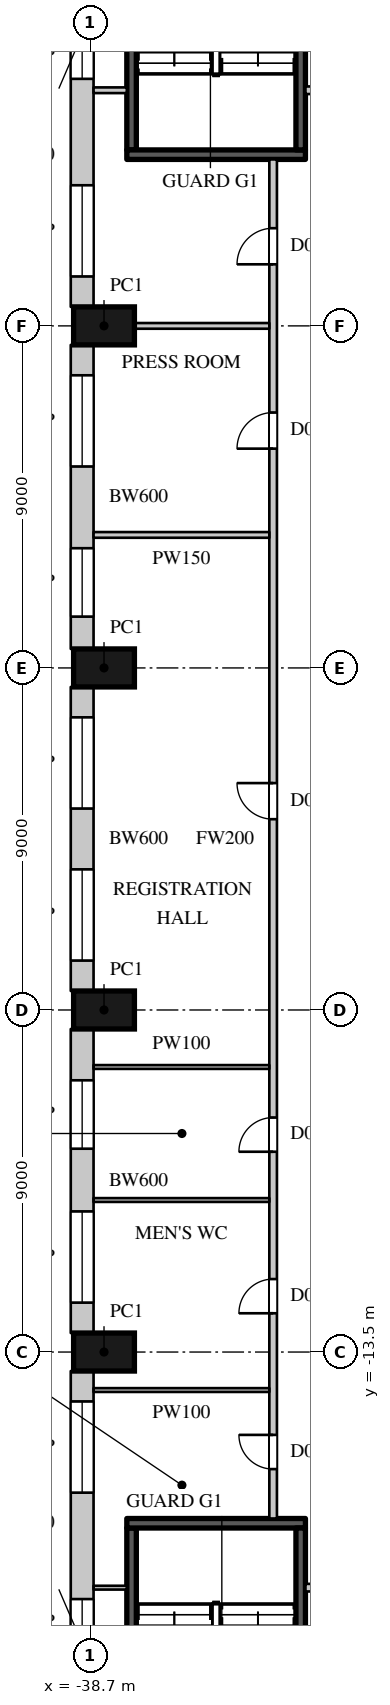
"""IFC4 building model, lengths in metres.
Left out: names, types, materials, properties, quantities, classifications, styles, units other than length and angle.
Written with IfcOpenShell. Run it as: python <this file> out.ifc"""

import sys

from ifc_helpers import new_model, si_unit, direction, frame, frame_2d, origin, origin_2d, place, context, subcontext, project, spatial, rectangle, extrude, element, fill, save


model = new_model("IFC4")
c1 = context("Model", 3, precision=1e-05, world=origin(), true_north=direction((0.0, 1.0)))
c2 = subcontext(c1, "Body", "Model", "MODEL_VIEW")
j1 = project(units=[si_unit("LENGTHUNIT", "METRE"), si_unit("PLANEANGLEUNIT", "RADIAN")], contexts=[c1])
p1 = place(None, origin())
s1 = spatial("IfcSite", under=j1, at=p1, CompositionType="ELEMENT")
p2 = place(p1, origin())
s2 = spatial("IfcBuilding", under=s1, at=p2, CompositionType="ELEMENT")
p3 = place(p2, frame((0.0, 0.0, 9.0)))
s3 = spatial("IfcBuildingStorey", under=s2, at=p3, CompositionType="ELEMENT", Elevation=9.0)
for number, where, z_axis, x_axis in (
    (1, (-38.35, 13.5, 0.0), (0.0, 0.0, 1.0), (0.0, -1.0, 0.0)),
    (2, (-38.35, 4.5, 0.0), (0.0, 0.0, 1.0), (0.0, -1.0, 0.0)),
    (3, (-38.35, -4.5, 0.0), (0.0, 0.0, 1.0), (0.0, -1.0, 0.0)),
    (4, (-38.35, -13.5, 0.0), (0.0, 0.0, 1.0), (0.0, -1.0, 0.0)),
):
    element("IfcColumn", number, at=place(p3, frame(where, z_axis=z_axis, x_axis=x_axis)), inside=s3, PredefinedType="COLUMN", context=c2, shape_type="SweptSolid", body=[
        extrude(rectangle(XDim=1.0, YDim=1.6, at=origin_2d()), origin(), (0.0, 0.0, 1.0), 10.0),
    ])
p4 = place(p3, frame((-38.925, 22.0, 0.0), z_axis=(0.0, 0.0, 1.0), x_axis=(0.0, -1.0, 0.0)))
e5 = element("IfcWall", 5, at=p4, inside=s3, PredefinedType="ELEMENTEDWALL", context=c2, shape_type="SweptSolid", body=[
    extrude(rectangle(XDim=8.0, YDim=0.6, at=frame_2d((4.0, 0.0))), origin(), (0.0, 0.0, 1.0), 9.6),
])
p5 = place(p4, frame((4.8, 0.0, 3.0)))
e6 = element("IfcOpeningElement", 6, at=p5, cuts=e5, PredefinedType="OPENING", context=c2, shape_type="SweptSolid", body=[
    extrude(rectangle(XDim=2.4, YDim=2.4, at=frame_2d((1.2, 1.2))), frame((0.0, 0.31, 0.0), z_axis=(0.0, -1.0, 0.0), x_axis=(1.0, 0.0, 0.0)), (0.0, 0.0, 1.0), 0.62),
])
p6 = place(p4, frame((0.8, 0.0, 3.0)))
e7 = element("IfcOpeningElement", 7, at=p6, cuts=e5, PredefinedType="OPENING", context=c2, shape_type="SweptSolid", body=[
    extrude(rectangle(XDim=1.2, YDim=2.4, at=frame_2d((0.6, 1.2))), frame((0.0, 0.31, 0.0), z_axis=(0.0, -1.0, 0.0), x_axis=(1.0, 0.0, 0.0)), (0.0, 0.0, 1.0), 0.62),
])
p7 = place(p3, frame((-38.925, 13.0, 0.0), z_axis=(0.0, 0.0, 1.0), x_axis=(0.0, -1.0, 0.0)))
e8 = element("IfcWall", 8, at=p7, inside=s3, PredefinedType="ELEMENTEDWALL", context=c2, shape_type="SweptSolid", body=[
    extrude(rectangle(XDim=8.0, YDim=0.6, at=frame_2d((4.0, 0.0))), origin(), (0.0, 0.0, 1.0), 9.6),
])
p8 = place(p7, frame((0.8, 0.0, 3.0)))
e9 = element("IfcOpeningElement", 9, at=p8, cuts=e8, PredefinedType="OPENING", context=c2, shape_type="SweptSolid", body=[
    extrude(rectangle(XDim=2.4, YDim=2.4, at=frame_2d((1.2, 1.2))), frame((0.0, 0.31, 0.0), z_axis=(0.0, -1.0, 0.0), x_axis=(1.0, 0.0, 0.0)), (0.0, 0.0, 1.0), 0.62),
])
p9 = place(p7, frame((5.35, 0.0, 3.0)))
e10 = element("IfcOpeningElement", 10, at=p9, cuts=e8, PredefinedType="OPENING", context=c2, shape_type="SweptSolid", body=[
    extrude(rectangle(XDim=1.8, YDim=2.4, at=frame_2d((0.9, 1.2))), frame((0.0, 0.31, 0.0), z_axis=(0.0, -1.0, 0.0), x_axis=(1.0, 0.0, 0.0)), (0.0, 0.0, 1.0), 0.62),
])
p10 = place(p3, frame((-38.925, 4.0, 0.0), z_axis=(0.0, 0.0, 1.0), x_axis=(0.0, -1.0, 0.0)))
e11 = element("IfcWall", 11, at=p10, inside=s3, PredefinedType="ELEMENTEDWALL", context=c2, shape_type="SweptSolid", body=[
    extrude(rectangle(XDim=8.0, YDim=0.6, at=frame_2d((4.0, 0.0))), origin(), (0.0, 0.0, 1.0), 9.6),
])
p11 = place(p10, frame((0.8, 0.0, 3.0)))
e12 = element("IfcOpeningElement", 12, at=p11, cuts=e11, PredefinedType="OPENING", context=c2, shape_type="SweptSolid", body=[
    extrude(rectangle(XDim=2.4, YDim=2.4, at=frame_2d((1.2, 1.2))), frame((0.0, 0.31, 0.0), z_axis=(0.0, -1.0, 0.0), x_axis=(1.0, 0.0, 0.0)), (0.0, 0.0, 1.0), 0.62),
])
p12 = place(p10, frame((4.8, 0.0, 3.0)))
e13 = element("IfcOpeningElement", 13, at=p12, cuts=e11, PredefinedType="OPENING", context=c2, shape_type="SweptSolid", body=[
    extrude(rectangle(XDim=2.4, YDim=2.4, at=frame_2d((1.2, 1.2))), frame((0.0, 0.31, 0.0), z_axis=(0.0, -1.0, 0.0), x_axis=(1.0, 0.0, 0.0)), (0.0, 0.0, 1.0), 0.62),
])
p13 = place(p3, frame((-38.925, -5.0, 0.0), z_axis=(0.0, 0.0, 1.0), x_axis=(0.0, -1.0, 0.0)))
e14 = element("IfcWall", 14, at=p13, inside=s3, PredefinedType="ELEMENTEDWALL", context=c2, shape_type="SweptSolid", body=[
    extrude(rectangle(XDim=8.0, YDim=0.6, at=frame_2d((4.0, 0.0))), origin(), (0.0, 0.0, 1.0), 9.6),
])
p14 = place(p13, frame((4.8, 0.0, 3.0)))
e15 = element("IfcOpeningElement", 15, at=p14, cuts=e14, PredefinedType="OPENING", context=c2, shape_type="SweptSolid", body=[
    extrude(rectangle(XDim=2.4, YDim=2.4, at=frame_2d((1.2, 1.2))), frame((0.0, 0.31, 0.0), z_axis=(0.0, -1.0, 0.0), x_axis=(1.0, 0.0, 0.0)), (0.0, 0.0, 1.0), 0.62),
])
p15 = place(p13, frame((1.35, 0.0, 3.0)))
e16 = element("IfcOpeningElement", 16, at=p15, cuts=e14, PredefinedType="OPENING", context=c2, shape_type="SweptSolid", body=[
    extrude(rectangle(XDim=1.8, YDim=2.4, at=frame_2d((0.9, 1.2))), frame((0.0, 0.31, 0.0), z_axis=(0.0, -1.0, 0.0), x_axis=(1.0, 0.0, 0.0)), (0.0, 0.0, 1.0), 0.62),
])
p16 = place(p3, frame((-38.925, -14.0, 0.0), z_axis=(0.0, 0.0, 1.0), x_axis=(0.0, -1.0, 0.0)))
e17 = element("IfcWall", 17, at=p16, inside=s3, PredefinedType="ELEMENTEDWALL", context=c2, shape_type="SweptSolid", body=[
    extrude(rectangle(XDim=8.0, YDim=0.6, at=frame_2d((4.0, 0.0))), origin(), (0.0, 0.0, 1.0), 9.6),
])
p17 = place(p16, frame((0.8, 0.0, 3.0)))
e18 = element("IfcOpeningElement", 18, at=p17, cuts=e17, PredefinedType="OPENING", context=c2, shape_type="SweptSolid", body=[
    extrude(rectangle(XDim=2.4, YDim=2.4, at=frame_2d((1.2, 1.2))), frame((0.0, 0.31, 0.0), z_axis=(0.0, -1.0, 0.0), x_axis=(1.0, 0.0, 0.0)), (0.0, 0.0, 1.0), 0.62),
])
p18 = place(p16, frame((6.0, 0.0, 3.0)))
e19 = element("IfcOpeningElement", 19, at=p18, cuts=e17, PredefinedType="OPENING", context=c2, shape_type="SweptSolid", body=[
    extrude(rectangle(XDim=1.2, YDim=2.4, at=frame_2d((0.6, 1.2))), frame((0.0, 0.31, 0.0), z_axis=(0.0, -1.0, 0.0), x_axis=(1.0, 0.0, 0.0)), (0.0, 0.0, 1.0), 0.62),
])
p19 = place(p3, frame((-33.9, -17.88, 0.0), z_axis=(0.0, 0.0, 1.0), x_axis=(0.0, 1.0, 0.0)))
e20 = element("IfcWall", 20, at=p19, inside=s3, PredefinedType="PARTITIONING", context=c2, shape_type="SweptSolid", body=[
    extrude(rectangle(XDim=35.76, YDim=0.2, at=frame_2d((17.88, 0.0))), origin(), (0.0, 0.0, 1.0), 9.598),
])
p20 = place(p19, frame((1.3, 0.0, 0.0)))
e21 = element("IfcOpeningElement", 21, at=p20, cuts=e20, PredefinedType="OPENING", context=c2, shape_type="SweptSolid", body=[
    extrude(rectangle(XDim=0.9, YDim=2.2, at=frame_2d((0.45, 1.1))), frame((0.0, 0.11, 0.0), z_axis=(0.0, -1.0, 0.0), x_axis=(1.0, 0.0, 0.0)), (0.0, 0.0, 1.0), 0.22),
])
p21 = place(p19, frame((5.4, 0.0, 0.0)))
e22 = element("IfcOpeningElement", 22, at=p21, cuts=e20, PredefinedType="OPENING", context=c2, shape_type="SweptSolid", body=[
    extrude(rectangle(XDim=0.9, YDim=2.2, at=frame_2d((0.45, 1.1))), frame((0.0, 0.11, 0.0), z_axis=(0.0, -1.0, 0.0), x_axis=(1.0, 0.0, 0.0)), (0.0, 0.0, 1.0), 0.22),
])
p22 = place(p19, frame((9.65, 0.0, 0.0)))
e23 = element("IfcOpeningElement", 23, at=p22, cuts=e20, PredefinedType="OPENING", context=c2, shape_type="SweptSolid", body=[
    extrude(rectangle(XDim=0.9, YDim=2.2, at=frame_2d((0.45, 1.1))), frame((0.0, 0.11, 0.0), z_axis=(0.0, -1.0, 0.0), x_axis=(1.0, 0.0, 0.0)), (0.0, 0.0, 1.0), 0.22),
])
p23 = place(p19, frame((18.4, 0.0, 0.0)))
e24 = element("IfcOpeningElement", 24, at=p23, cuts=e20, PredefinedType="OPENING", context=c2, shape_type="SweptSolid", body=[
    extrude(rectangle(XDim=0.95, YDim=2.2, at=frame_2d((0.475, 1.1))), frame((0.0, 0.11, 0.0), z_axis=(0.0, -1.0, 0.0), x_axis=(1.0, 0.0, 0.0)), (0.0, 0.0, 1.0), 0.22),
])
p24 = place(p19, frame((28.15, 0.0, 0.0)))
e25 = element("IfcOpeningElement", 25, at=p24, cuts=e20, PredefinedType="OPENING", context=c2, shape_type="SweptSolid", body=[
    extrude(rectangle(XDim=0.95, YDim=2.2, at=frame_2d((0.475, 1.1))), frame((0.0, 0.11, 0.0), z_axis=(0.0, -1.0, 0.0), x_axis=(1.0, 0.0, 0.0)), (0.0, 0.0, 1.0), 0.22),
])
p25 = place(p19, frame((33.0, 0.0, 0.0)))
e26 = element("IfcOpeningElement", 26, at=p25, cuts=e20, PredefinedType="OPENING", context=c2, shape_type="SweptSolid", body=[
    extrude(rectangle(XDim=0.95, YDim=2.2, at=frame_2d((0.475, 1.1))), frame((0.0, 0.11, 0.0), z_axis=(0.0, -1.0, 0.0), x_axis=(1.0, 0.0, 0.0)), (0.0, 0.0, 1.0), 0.22),
])
p26 = place(p3, frame((-33.05, -19.7, 0.0), z_axis=(0.0, 0.0, 1.0), x_axis=(1.0, 0.0, 0.0)))
e27 = element("IfcWall", 27, at=p26, inside=s3, PredefinedType="PARTITIONING", context=c2, shape_type="SweptSolid", body=[
    extrude(rectangle(XDim=3.077, YDim=0.2, at=frame_2d((1.539, 0.0))), origin(), (0.0, 0.0, 1.0), 9.598),
])
p27 = place(p26, frame((0.7, 0.0, 0.0)))
e28 = element("IfcOpeningElement", 28, at=p27, cuts=e27, PredefinedType="OPENING", context=c2, shape_type="SweptSolid", body=[
    extrude(rectangle(XDim=1.6, YDim=2.4, at=frame_2d((0.8, 1.2))), frame((0.0, 0.11, 0.0), z_axis=(0.0, -1.0, 0.0), x_axis=(1.0, 0.0, 0.0)), (0.0, 0.0, 1.0), 0.22),
])
p28 = place(p3, frame((-33.05, 19.7, 0.0), z_axis=(0.0, 0.0, 1.0), x_axis=(1.0, 0.0, 0.0)))
e29 = element("IfcWall", 29, at=p28, inside=s3, PredefinedType="PARTITIONING", context=c2, shape_type="SweptSolid", body=[
    extrude(rectangle(XDim=3.077, YDim=0.2, at=frame_2d((1.539, 0.0))), origin(), (0.0, 0.0, 1.0), 9.598),
])
p29 = place(p28, frame((0.7, 0.0, 0.0)))
e30 = element("IfcOpeningElement", 30, at=p29, cuts=e29, PredefinedType="OPENING", context=c2, shape_type="SweptSolid", body=[
    extrude(rectangle(XDim=1.6, YDim=2.4, at=frame_2d((0.8, 1.2))), frame((0.0, 0.11, 0.0), z_axis=(0.0, -1.0, 0.0), x_axis=(1.0, 0.0, 0.0)), (0.0, 0.0, 1.0), 0.22),
])
p30 = place(p3, frame((-38.625, 8.0, 0.0), z_axis=(0.0, 0.0, 1.0), x_axis=(1.0, 0.0, 0.0)))
e31 = element("IfcWall", 31, at=p30, inside=s3, PredefinedType="PARTITIONING", context=c2, shape_type="SweptSolid", body=[
    extrude(rectangle(XDim=4.625, YDim=0.15, at=frame_2d((2.312, 0.0))), origin(), (0.0, 0.0, 1.0), 9.598),
])
p31 = place(p3, frame((-37.55, 13.5, 0.0), z_axis=(0.0, 0.0, 1.0), x_axis=(1.0, 0.0, 0.0)))
e32 = element("IfcWall", 32, at=p31, inside=s3, PredefinedType="PARTITIONING", context=c2, shape_type="SweptSolid", body=[
    extrude(rectangle(XDim=3.55, YDim=0.15, at=frame_2d((1.775, 0.0))), origin(), (0.0, 0.0, 1.0), 9.598),
])
p32 = place(p3, frame((-38.625, 19.7, 0.0), z_axis=(0.0, 0.0, 1.0), x_axis=(1.0, 0.0, 0.0)))
e33 = element("IfcWall", 33, at=p32, inside=s3, PredefinedType="PARTITIONING", context=c2, shape_type="SweptSolid", body=[
    extrude(rectangle(XDim=0.875, YDim=0.15, at=frame_2d((0.438, 0.0))), origin(), (0.0, 0.0, 1.0), 9.598),
])
p33 = place(p3, frame((-37.625, -22.0, 0.0), z_axis=(0.0, 0.0, 1.0), x_axis=(0.0, 1.0, 0.0)))
e34 = element("IfcWall", 34, at=p33, inside=s3, PredefinedType="SHEAR", context=c2, shape_type="SweptSolid", body=[
    extrude(rectangle(XDim=3.87, YDim=0.25, at=frame_2d((1.935, 0.0))), origin(), (0.0, 0.0, 1.0), 9.6),
])
p34 = place(p3, frame((-37.75, -18.005, 0.0), z_axis=(0.0, 0.0, 1.0), x_axis=(1.0, 0.0, 0.0)))
e35 = element("IfcWall", 35, at=p34, inside=s3, PredefinedType="SHEAR", context=c2, shape_type="SweptSolid", body=[
    extrude(rectangle(XDim=4.7, YDim=0.25, at=frame_2d((2.35, 0.0))), origin(), (0.0, 0.0, 1.0), 9.6),
])
p35 = place(p3, frame((-37.625, 18.13, 0.0), z_axis=(0.0, 0.0, 1.0), x_axis=(0.0, 1.0, 0.0)))
e36 = element("IfcWall", 36, at=p35, inside=s3, PredefinedType="SHEAR", context=c2, shape_type="SweptSolid", body=[
    extrude(rectangle(XDim=3.87, YDim=0.25, at=frame_2d((1.935, 0.0))), origin(), (0.0, 0.0, 1.0), 9.6),
])
p36 = place(p3, frame((-37.75, 18.005, 0.0), z_axis=(0.0, 0.0, 1.0), x_axis=(1.0, 0.0, 0.0)))
e37 = element("IfcWall", 37, at=p36, inside=s3, PredefinedType="SHEAR", context=c2, shape_type="SweptSolid", body=[
    extrude(rectangle(XDim=4.7, YDim=0.25, at=frame_2d((2.35, 0.0))), origin(), (0.0, 0.0, 1.0), 9.6),
])
p37 = place(p3, frame((-33.175, -26.05, 0.0), z_axis=(0.0, 0.0, 1.0), x_axis=(0.0, 1.0, 0.0)))
e38 = element("IfcWall", 38, at=p37, inside=s3, PredefinedType="SHEAR", context=c2, shape_type="SweptSolid", body=[
    extrude(rectangle(XDim=7.92, YDim=0.25, at=frame_2d((3.96, 0.0))), origin(), (0.0, 0.0, 1.0), 9.6),
])
p38 = place(p37, frame((0.55, 0.0, 0.0)))
e39 = element("IfcOpeningElement", 39, at=p38, cuts=e38, PredefinedType="OPENING", context=c2, shape_type="SweptSolid", body=[
    extrude(rectangle(XDim=0.9, YDim=2.2, at=frame_2d((0.45, 1.1))), frame((0.0, 0.135, 0.0), z_axis=(0.0, -1.0, 0.0), x_axis=(1.0, 0.0, 0.0)), (0.0, 0.0, 1.0), 0.27),
])
p39 = place(p3, frame((-33.175, 18.13, 0.0), z_axis=(0.0, 0.0, 1.0), x_axis=(0.0, 1.0, 0.0)))
e40 = element("IfcWall", 40, at=p39, inside=s3, PredefinedType="SHEAR", context=c2, shape_type="SweptSolid", body=[
    extrude(rectangle(XDim=7.92, YDim=0.25, at=frame_2d((3.96, 0.0))), origin(), (0.0, 0.0, 1.0), 9.6),
])
p40 = place(p39, frame((6.45, 0.0, 0.0)))
e41 = element("IfcOpeningElement", 41, at=p40, cuts=e40, PredefinedType="OPENING", context=c2, shape_type="SweptSolid", body=[
    extrude(rectangle(XDim=0.9, YDim=2.2, at=frame_2d((0.45, 1.1))), frame((0.0, 0.135, 0.0), z_axis=(0.0, -1.0, 0.0), x_axis=(1.0, 0.0, 0.0)), (0.0, 0.0, 1.0), 0.27),
])
p41 = place(p3, frame((-38.625, -19.7, 0.0), z_axis=(0.0, 0.0, 1.0), x_axis=(1.0, 0.0, 0.0)))
e42 = element("IfcWall", 42, at=p41, inside=s3, PredefinedType="PARTITIONING", context=c2, shape_type="SweptSolid", body=[
    extrude(rectangle(XDim=0.875, YDim=0.1, at=frame_2d((0.438, 0.0))), origin(), (0.0, 0.0, 1.0), 9.598),
])
for number, where, z_axis, x_axis in (
    (43, (-38.625, -14.5, 0.0), (0.0, 0.0, 1.0), (1.0, 0.0, 0.0)),
    (44, (-38.625, -9.5, 0.0), (0.0, 0.0, 1.0), (1.0, 0.0, 0.0)),
    (45, (-38.625, -6.0, 0.0), (0.0, 0.0, 1.0), (1.0, 0.0, 0.0)),
):
    element("IfcWall", number, at=place(p3, frame(where, z_axis=z_axis, x_axis=x_axis)), inside=s3, PredefinedType="PARTITIONING", context=c2, shape_type="SweptSolid", body=[
        extrude(rectangle(XDim=4.625, YDim=0.1, at=frame_2d((2.312, 0.0))), origin(), (0.0, 0.0, 1.0), 9.598),
    ])
p42 = place(p5, origin())
e46 = element("IfcWindow", 46, at=p42, inside=s3, PartitioningType="SINGLE_PANEL", PredefinedType="WINDOW", context=c2, shape_type="SweptSolid", body=[
    extrude(rectangle(XDim=2.4, YDim=2.4, at=frame_2d((1.2, 1.2))), frame((0.0, 0.06, 0.0), z_axis=(0.0, -1.0, 0.0), x_axis=(1.0, 0.0, 0.0)), (0.0, 0.0, 1.0), 0.06),
])
fill(e6, e46)
p43 = place(p8, origin())
e47 = element("IfcWindow", 47, at=p43, inside=s3, PartitioningType="SINGLE_PANEL", PredefinedType="WINDOW", context=c2, shape_type="SweptSolid", body=[
    extrude(rectangle(XDim=2.4, YDim=2.4, at=frame_2d((1.2, 1.2))), frame((0.0, 0.06, 0.0), z_axis=(0.0, -1.0, 0.0), x_axis=(1.0, 0.0, 0.0)), (0.0, 0.0, 1.0), 0.06),
])
fill(e9, e47)
p44 = place(p11, origin())
e48 = element("IfcWindow", 48, at=p44, inside=s3, PartitioningType="SINGLE_PANEL", PredefinedType="WINDOW", context=c2, shape_type="SweptSolid", body=[
    extrude(rectangle(XDim=2.4, YDim=2.4, at=frame_2d((1.2, 1.2))), frame((0.0, 0.06, 0.0), z_axis=(0.0, -1.0, 0.0), x_axis=(1.0, 0.0, 0.0)), (0.0, 0.0, 1.0), 0.06),
])
fill(e12, e48)
p45 = place(p12, origin())
e49 = element("IfcWindow", 49, at=p45, inside=s3, PartitioningType="SINGLE_PANEL", PredefinedType="WINDOW", context=c2, shape_type="SweptSolid", body=[
    extrude(rectangle(XDim=2.4, YDim=2.4, at=frame_2d((1.2, 1.2))), frame((0.0, 0.06, 0.0), z_axis=(0.0, -1.0, 0.0), x_axis=(1.0, 0.0, 0.0)), (0.0, 0.0, 1.0), 0.06),
])
fill(e13, e49)
p46 = place(p14, origin())
e50 = element("IfcWindow", 50, at=p46, inside=s3, PartitioningType="SINGLE_PANEL", PredefinedType="WINDOW", context=c2, shape_type="SweptSolid", body=[
    extrude(rectangle(XDim=2.4, YDim=2.4, at=frame_2d((1.2, 1.2))), frame((0.0, 0.06, 0.0), z_axis=(0.0, -1.0, 0.0), x_axis=(1.0, 0.0, 0.0)), (0.0, 0.0, 1.0), 0.06),
])
fill(e15, e50)
p47 = place(p17, origin())
e51 = element("IfcWindow", 51, at=p47, inside=s3, PartitioningType="SINGLE_PANEL", PredefinedType="WINDOW", context=c2, shape_type="SweptSolid", body=[
    extrude(rectangle(XDim=2.4, YDim=2.4, at=frame_2d((1.2, 1.2))), frame((0.0, 0.06, 0.0), z_axis=(0.0, -1.0, 0.0), x_axis=(1.0, 0.0, 0.0)), (0.0, 0.0, 1.0), 0.06),
])
fill(e18, e51)
p48 = place(p20, origin())
e52 = element("IfcDoor", 52, at=p48, inside=s3, OperationType="SINGLE_SWING_RIGHT", PredefinedType="DOOR", context=c2, shape_type="SweptSolid", body=[
    extrude(rectangle(XDim=0.9, YDim=2.2, at=frame_2d((0.45, 1.1))), frame((0.0, 0.025, 0.0), z_axis=(0.0, -1.0, 0.0), x_axis=(1.0, 0.0, 0.0)), (0.0, 0.0, 1.0), 0.05),
])
fill(e21, e52)
p49 = place(p21, origin())
e53 = element("IfcDoor", 53, at=p49, inside=s3, OperationType="SINGLE_SWING_LEFT", PredefinedType="DOOR", context=c2, shape_type="SweptSolid", body=[
    extrude(rectangle(XDim=0.9, YDim=2.2, at=frame_2d((0.45, 1.1))), frame((0.0, 0.025, 0.0), z_axis=(0.0, -1.0, 0.0), x_axis=(1.0, 0.0, 0.0)), (0.0, 0.0, 1.0), 0.05),
])
fill(e22, e53)
p50 = place(p22, origin())
e54 = element("IfcDoor", 54, at=p50, inside=s3, OperationType="SINGLE_SWING_LEFT", PredefinedType="DOOR", context=c2, shape_type="SweptSolid", body=[
    extrude(rectangle(XDim=0.9, YDim=2.2, at=frame_2d((0.45, 1.1))), frame((0.0, 0.025, 0.0), z_axis=(0.0, -1.0, 0.0), x_axis=(1.0, 0.0, 0.0)), (0.0, 0.0, 1.0), 0.05),
])
fill(e23, e54)
p51 = place(p23, origin())
e55 = element("IfcDoor", 55, at=p51, inside=s3, OperationType="SINGLE_SWING_RIGHT", PredefinedType="DOOR", context=c2, shape_type="SweptSolid", body=[
    extrude(rectangle(XDim=0.95, YDim=2.2, at=frame_2d((0.475, 1.1))), frame((0.0, 0.025, 0.0), z_axis=(0.0, -1.0, 0.0), x_axis=(1.0, 0.0, 0.0)), (0.0, 0.0, 1.0), 0.05),
])
fill(e24, e55)
p52 = place(p24, origin())
e56 = element("IfcDoor", 56, at=p52, inside=s3, OperationType="SINGLE_SWING_LEFT", PredefinedType="DOOR", context=c2, shape_type="SweptSolid", body=[
    extrude(rectangle(XDim=0.95, YDim=2.2, at=frame_2d((0.475, 1.1))), frame((0.0, 0.025, 0.0), z_axis=(0.0, -1.0, 0.0), x_axis=(1.0, 0.0, 0.0)), (0.0, 0.0, 1.0), 0.05),
])
fill(e25, e56)
p53 = place(p25, origin())
e57 = element("IfcDoor", 57, at=p53, inside=s3, OperationType="SINGLE_SWING_LEFT", PredefinedType="DOOR", context=c2, shape_type="SweptSolid", body=[
    extrude(rectangle(XDim=0.95, YDim=2.2, at=frame_2d((0.475, 1.1))), frame((0.0, 0.025, 0.0), z_axis=(0.0, -1.0, 0.0), x_axis=(1.0, 0.0, 0.0)), (0.0, 0.0, 1.0), 0.05),
])
fill(e26, e57)
p54 = place(p6, origin())
e58 = element("IfcWindow", 58, at=p54, inside=s3, PartitioningType="SINGLE_PANEL", PredefinedType="WINDOW", context=c2, shape_type="SweptSolid", body=[
    extrude(rectangle(XDim=1.2, YDim=2.4, at=frame_2d((0.6, 1.2))), frame((0.0, 0.06, 0.0), z_axis=(0.0, -1.0, 0.0), x_axis=(1.0, 0.0, 0.0)), (0.0, 0.0, 1.0), 0.06),
])
fill(e7, e58)
p55 = place(p9, origin())
e59 = element("IfcWindow", 59, at=p55, inside=s3, PartitioningType="SINGLE_PANEL", PredefinedType="WINDOW", context=c2, shape_type="SweptSolid", body=[
    extrude(rectangle(XDim=1.8, YDim=2.4, at=frame_2d((0.9, 1.2))), frame((0.0, 0.06, 0.0), z_axis=(0.0, -1.0, 0.0), x_axis=(1.0, 0.0, 0.0)), (0.0, 0.0, 1.0), 0.06),
])
fill(e10, e59)
p56 = place(p15, origin())
e60 = element("IfcWindow", 60, at=p56, inside=s3, PartitioningType="SINGLE_PANEL", PredefinedType="WINDOW", context=c2, shape_type="SweptSolid", body=[
    extrude(rectangle(XDim=1.8, YDim=2.4, at=frame_2d((0.9, 1.2))), frame((0.0, 0.06, 0.0), z_axis=(0.0, -1.0, 0.0), x_axis=(1.0, 0.0, 0.0)), (0.0, 0.0, 1.0), 0.06),
])
fill(e16, e60)
p57 = place(p18, origin())
e61 = element("IfcWindow", 61, at=p57, inside=s3, PartitioningType="SINGLE_PANEL", PredefinedType="WINDOW", context=c2, shape_type="SweptSolid", body=[
    extrude(rectangle(XDim=1.2, YDim=2.4, at=frame_2d((0.6, 1.2))), frame((0.0, 0.06, 0.0), z_axis=(0.0, -1.0, 0.0), x_axis=(1.0, 0.0, 0.0)), (0.0, 0.0, 1.0), 0.06),
])
fill(e19, e61)
save(model, sys.argv[1])
